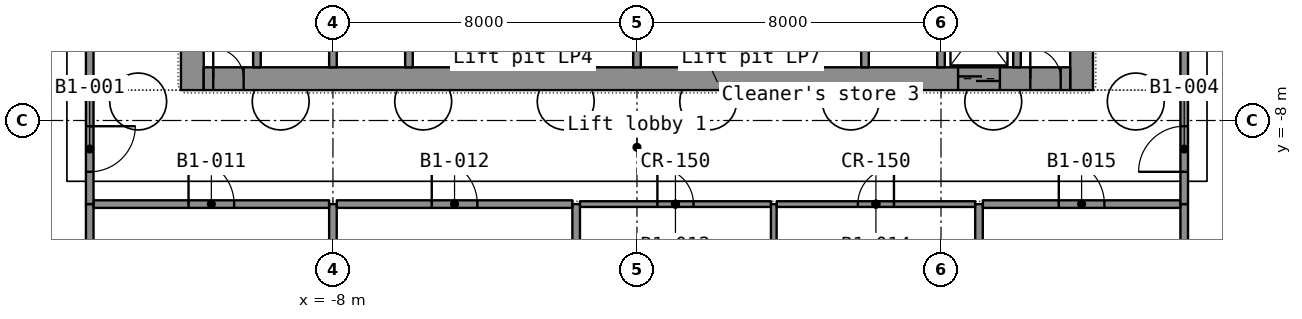
"""IFC4 building model, lengths in metres.
Left out: names, types, materials, properties, quantities, classifications, styles, units other than length and angle.
Written with IfcOpenShell. Run it as: python <this file> out.ifc"""

import sys

from ifc_helpers import new_model, si_unit, direction, frame, frame_2d, origin, place, context, subcontext, project, spatial, rectangle, extrude, element, fill, save


model = new_model("IFC4")
c1 = context("Model", 3, precision=1e-05, world=origin(), true_north=direction((0.0, 1.0)))
c2 = subcontext(c1, "Body", "Model", "MODEL_VIEW")
j1 = project(units=[si_unit("LENGTHUNIT", "METRE"), si_unit("PLANEANGLEUNIT", "RADIAN")], contexts=[c1])
p1 = place(None, origin())
s1 = spatial("IfcSite", under=j1, at=p1, CompositionType="ELEMENT")
p2 = place(p1, origin())
s2 = spatial("IfcBuilding", under=s1, at=p2, CompositionType="ELEMENT")
p3 = place(p2, frame((0.0, 0.0, -5.0)))
s3 = spatial("IfcBuildingStorey", under=s2, at=p3, CompositionType="ELEMENT", Elevation=-5.0)
p4 = place(p3, frame((-11.7, -7.2, 0.0), z_axis=(0.0, 0.0, 1.0), x_axis=(0.0, 1.0, 0.0)))
e1 = element("IfcWall", 1, at=p4, inside=s3, PredefinedType="SHEAR", context=c2, shape_type="SweptSolid", body=[
    extrude(rectangle(XDim=14.4, YDim=0.6, at=frame_2d((7.2, 0.0))), origin(), (0.0, 0.0, 1.0), 4.6),
])
p5 = place(p4, frame((6.5, 0.0, 0.0)))
e2 = element("IfcOpeningElement", 2, at=p5, cuts=e1, PredefinedType="OPENING", context=c2, shape_type="SweptSolid", body=[
    extrude(rectangle(XDim=1.4, YDim=2.2, at=frame_2d((0.7, 1.1))), frame((0.0, 0.31, 0.0), z_axis=(0.0, -1.0, 0.0), x_axis=(1.0, 0.0, 0.0)), (0.0, 0.0, 1.0), 0.62),
])
p6 = place(p3, frame((11.7, -7.2, 0.0), z_axis=(0.0, 0.0, 1.0), x_axis=(0.0, 1.0, 0.0)))
e3 = element("IfcWall", 3, at=p6, inside=s3, PredefinedType="SHEAR", context=c2, shape_type="SweptSolid", body=[
    extrude(rectangle(XDim=14.4, YDim=0.6, at=frame_2d((7.2, 0.0))), origin(), (0.0, 0.0, 1.0), 4.6),
])
p7 = place(p6, frame((6.5, 0.0, 0.0)))
e4 = element("IfcOpeningElement", 4, at=p7, cuts=e3, PredefinedType="OPENING", context=c2, shape_type="SweptSolid", body=[
    extrude(rectangle(XDim=1.4, YDim=2.2, at=frame_2d((0.7, 1.1))), frame((0.0, 0.31, 0.0), z_axis=(0.0, -1.0, 0.0), x_axis=(1.0, 0.0, 0.0)), (0.0, 0.0, 1.0), 0.62),
])
p8 = place(p3, frame((-11.4, -6.9, 0.0), z_axis=(0.0, 0.0, 1.0), x_axis=(1.0, 0.0, 0.0)))
e5 = element("IfcWall", 5, at=p8, inside=s3, PredefinedType="SHEAR", context=c2, shape_type="SweptSolid", body=[
    extrude(rectangle(XDim=22.8, YDim=0.6, at=frame_2d((11.4, 0.0))), origin(), (0.0, 0.0, 1.0), 4.6),
])
p9 = place(p8, frame((19.85, 0.0, 0.0)))
e6 = element("IfcOpeningElement", 6, at=p9, cuts=e5, PredefinedType="OPENING", context=c2, shape_type="SweptSolid", body=[
    extrude(rectangle(XDim=1.1, YDim=2.2, at=frame_2d((0.55, 1.1))), frame((0.0, 0.31, 0.0), z_axis=(0.0, -1.0, 0.0), x_axis=(1.0, 0.0, 0.0)), (0.0, 0.0, 1.0), 0.62),
])
p10 = place(p8, frame((0.25, 0.0, 0.0)))
e7 = element("IfcOpeningElement", 7, at=p10, cuts=e5, PredefinedType="OPENING", context=c2, shape_type="SweptSolid", body=[
    extrude(rectangle(XDim=0.8, YDim=2.05, at=frame_2d((0.4, 1.025))), frame((0.0, 0.31, 0.0), z_axis=(0.0, -1.0, 0.0), x_axis=(1.0, 0.0, 0.0)), (0.0, 0.0, 1.0), 0.62),
])
p11 = place(p8, frame((21.75, 0.0, 0.0)))
e8 = element("IfcOpeningElement", 8, at=p11, cuts=e5, PredefinedType="OPENING", context=c2, shape_type="SweptSolid", body=[
    extrude(rectangle(XDim=0.8, YDim=2.05, at=frame_2d((0.4, 1.025))), frame((0.0, 0.31, 0.0), z_axis=(0.0, -1.0, 0.0), x_axis=(1.0, 0.0, 0.0)), (0.0, 0.0, 1.0), 0.62),
])
for number, where, z_axis, x_axis in (
    (9, (-10.0, -6.6, 0.0), (0.0, 0.0, 1.0), (0.0, 1.0, 0.0)),
    (10, (-8.0, -6.6, 0.0), (0.0, 0.0, 1.0), (0.0, 1.0, 0.0)),
    (11, (-6.0, -6.6, 0.0), (0.0, 0.0, 1.0), (0.0, 1.0, 0.0)),
    (12, (-4.0, -6.6, 0.0), (0.0, 0.0, 1.0), (0.0, 1.0, 0.0)),
    (13, (-2.0, -6.6, 0.0), (0.0, 0.0, 1.0), (0.0, 1.0, 0.0)),
    (14, (0.0, -6.6, 0.0), (0.0, 0.0, 1.0), (0.0, 1.0, 0.0)),
    (15, (2.0, -6.6, 0.0), (0.0, 0.0, 1.0), (0.0, 1.0, 0.0)),
    (16, (4.0, -6.6, 0.0), (0.0, 0.0, 1.0), (0.0, 1.0, 0.0)),
    (17, (6.0, -6.6, 0.0), (0.0, 0.0, 1.0), (0.0, 1.0, 0.0)),
    (18, (8.0, -6.6, 0.0), (0.0, 0.0, 1.0), (0.0, 1.0, 0.0)),
    (19, (10.0, -6.6, 0.0), (0.0, 0.0, 1.0), (0.0, 1.0, 0.0)),
):
    element("IfcWall", number, at=place(p3, frame(where, z_axis=z_axis, x_axis=x_axis)), inside=s3, PredefinedType="SHEAR", context=c2, shape_type="SweptSolid", body=[
        extrude(rectangle(XDim=2.7, YDim=0.2, at=frame_2d((1.35, 0.0))), origin(), (0.0, 0.0, 1.0), 4.6),
    ])
p12 = place(p3, frame((-1.6, -26.824, 0.0), z_axis=(0.0, 0.0, 1.0), x_axis=(0.0, 1.0, 0.0)))
e20 = element("IfcWall", 20, at=p12, inside=s3, PredefinedType="PARTITIONING", context=c2, shape_type="SweptSolid", body=[
    extrude(rectangle(XDim=16.624, YDim=0.2, at=frame_2d((8.312, 0.0))), origin(), (0.0, 0.0, 1.0), 3.6),
])
for number, where, z_axis, x_axis in (
    (21, (-14.4, -7.2, 0.0), (0.0, 0.0, 1.0), (-1.0, 0.0, 0.0)),
    (22, (31.1, -7.2, 0.0), (0.0, 0.0, 1.0), (-1.0, 0.0, 0.0)),
):
    element("IfcWall", number, at=place(p3, frame(where, z_axis=z_axis, x_axis=x_axis)), inside=s3, PredefinedType="PARTITIONING", context=c2, shape_type="SweptSolid", body=[
        extrude(rectangle(XDim=16.7, YDim=0.2, at=frame_2d((8.35, 0.0))), origin(), (0.0, 0.0, 1.0), 3.6),
    ])
p13 = place(p3, frame((3.6, -26.69, 0.0), z_axis=(0.0, 0.0, 1.0), x_axis=(0.0, 1.0, 0.0)))
e23 = element("IfcWall", 23, at=p13, inside=s3, PredefinedType="PARTITIONING", context=c2, shape_type="SweptSolid", body=[
    extrude(rectangle(XDim=16.49, YDim=0.15, at=frame_2d((8.245, 0.0))), origin(), (0.0, 0.0, 1.0), 3.6),
])
p14 = place(p3, frame((-8.0, -26.12, 0.0), z_axis=(0.0, 0.0, 1.0), x_axis=(0.0, 1.0, 0.0)))
e24 = element("IfcWall", 24, at=p14, inside=s3, PredefinedType="PARTITIONING", context=c2, shape_type="SweptSolid", body=[
    extrude(rectangle(XDim=15.92, YDim=0.2, at=frame_2d((7.96, 0.0))), origin(), (0.0, 0.0, 1.0), 3.6),
])
p15 = place(p3, frame((9.0, -25.861, 0.0), z_axis=(0.0, 0.0, 1.0), x_axis=(0.0, 1.0, 0.0)))
e25 = element("IfcWall", 25, at=p15, inside=s3, PredefinedType="PARTITIONING", context=c2, shape_type="SweptSolid", body=[
    extrude(rectangle(XDim=15.661, YDim=0.2, at=frame_2d((7.831, 0.0))), origin(), (0.0, 0.0, 1.0), 3.6),
])
p16 = place(p3, frame((-14.4, 7.098, 0.0), z_axis=(0.0, 0.0, 1.0), x_axis=(0.0, -1.0, 0.0)))
e26 = element("IfcWall", 26, at=p16, inside=s3, PredefinedType="PARTITIONING", context=c2, shape_type="SweptSolid", body=[
    extrude(rectangle(XDim=14.196, YDim=0.2, at=frame_2d((7.098, 0.0))), origin(), (0.0, 0.0, 1.0), 3.6),
])
p17 = place(p16, frame((6.498, 0.0, 0.0)))
e27 = element("IfcOpeningElement", 27, at=p17, cuts=e26, PredefinedType="OPENING", context=c2, shape_type="SweptSolid", body=[
    extrude(rectangle(XDim=1.2, YDim=2.2, at=frame_2d((0.6, 1.1))), frame((0.0, 0.11, 0.0), z_axis=(0.0, -1.0, 0.0), x_axis=(1.0, 0.0, 0.0)), (0.0, 0.0, 1.0), 0.22),
])
p18 = place(p3, frame((14.4, -7.098, 0.0), z_axis=(0.0, 0.0, 1.0), x_axis=(0.0, 1.0, 0.0)))
e28 = element("IfcWall", 28, at=p18, inside=s3, PredefinedType="PARTITIONING", context=c2, shape_type="SweptSolid", body=[
    extrude(rectangle(XDim=14.196, YDim=0.2, at=frame_2d((7.098, 0.0))), origin(), (0.0, 0.0, 1.0), 3.6),
])
p19 = place(p18, frame((6.498, 0.0, 0.0)))
e29 = element("IfcOpeningElement", 29, at=p19, cuts=e28, PredefinedType="OPENING", context=c2, shape_type="SweptSolid", body=[
    extrude(rectangle(XDim=1.2, YDim=2.2, at=frame_2d((0.6, 1.1))), frame((0.0, 0.11, 0.0), z_axis=(0.0, -1.0, 0.0), x_axis=(1.0, 0.0, 0.0)), (0.0, 0.0, 1.0), 0.22),
])
for number, where, z_axis, x_axis in (
    (30, (-14.4, -23.991, 0.0), (0.0, 0.0, 1.0), (0.0, 1.0, 0.0)),
    (31, (14.4, -10.2, 0.0), (0.0, 0.0, 1.0), (0.0, -1.0, 0.0)),
):
    element("IfcWall", number, at=place(p3, frame(where, z_axis=z_axis, x_axis=x_axis)), inside=s3, PredefinedType="PARTITIONING", context=c2, shape_type="SweptSolid", body=[
        extrude(rectangle(XDim=13.791, YDim=0.2, at=frame_2d((6.896, 0.0))), origin(), (0.0, 0.0, 1.0), 3.6),
    ])
p20 = place(p3, frame((-14.298, -10.2, 0.0), z_axis=(0.0, 0.0, 1.0), x_axis=(1.0, 0.0, 0.0)))
e32 = element("IfcWall", 32, at=p20, inside=s3, PredefinedType="PARTITIONING", context=c2, shape_type="SweptSolid", body=[
    extrude(rectangle(XDim=6.196, YDim=0.2, at=frame_2d((3.098, 0.0))), origin(), (0.0, 0.0, 1.0), 3.6),
])
p21 = place(p20, frame((2.498, 0.0, 0.0)))
e33 = element("IfcOpeningElement", 33, at=p21, cuts=e32, PredefinedType="OPENING", context=c2, shape_type="SweptSolid", body=[
    extrude(rectangle(XDim=1.2, YDim=2.2, at=frame_2d((0.6, 1.1))), frame((0.0, 0.11, 0.0), z_axis=(0.0, -1.0, 0.0), x_axis=(1.0, 0.0, 0.0)), (0.0, 0.0, 1.0), 0.22),
])
p22 = place(p3, frame((-7.898, -10.2, 0.0), z_axis=(0.0, 0.0, 1.0), x_axis=(1.0, 0.0, 0.0)))
e34 = element("IfcWall", 34, at=p22, inside=s3, PredefinedType="PARTITIONING", context=c2, shape_type="SweptSolid", body=[
    extrude(rectangle(XDim=6.196, YDim=0.2, at=frame_2d((3.098, 0.0))), origin(), (0.0, 0.0, 1.0), 3.6),
])
p23 = place(p22, frame((2.498, 0.0, 0.0)))
e35 = element("IfcOpeningElement", 35, at=p23, cuts=e34, PredefinedType="OPENING", context=c2, shape_type="SweptSolid", body=[
    extrude(rectangle(XDim=1.2, YDim=2.2, at=frame_2d((0.6, 1.1))), frame((0.0, 0.11, 0.0), z_axis=(0.0, -1.0, 0.0), x_axis=(1.0, 0.0, 0.0)), (0.0, 0.0, 1.0), 0.22),
])
p24 = place(p3, frame((3.677, -10.2, 0.0), z_axis=(0.0, 0.0, 1.0), x_axis=(1.0, 0.0, 0.0)))
e36 = element("IfcWall", 36, at=p24, inside=s3, PredefinedType="PARTITIONING", context=c2, shape_type="SweptSolid", body=[
    extrude(rectangle(XDim=5.221, YDim=0.15, at=frame_2d((2.61, 0.0))), origin(), (0.0, 0.0, 1.0), 3.6),
])
p25 = place(p24, frame((2.135, 0.0, 0.0)))
e37 = element("IfcOpeningElement", 37, at=p25, cuts=e36, PredefinedType="OPENING", context=c2, shape_type="SweptSolid", body=[
    extrude(rectangle(XDim=0.95, YDim=2.15, at=frame_2d((0.475, 1.075))), frame((0.0, 0.085, 0.0), z_axis=(0.0, -1.0, 0.0), x_axis=(1.0, 0.0, 0.0)), (0.0, 0.0, 1.0), 0.17),
])
p26 = place(p3, frame((9.102, -10.2, 0.0), z_axis=(0.0, 0.0, 1.0), x_axis=(1.0, 0.0, 0.0)))
e38 = element("IfcWall", 38, at=p26, inside=s3, PredefinedType="PARTITIONING", context=c2, shape_type="SweptSolid", body=[
    extrude(rectangle(XDim=5.196, YDim=0.2, at=frame_2d((2.598, 0.0))), origin(), (0.0, 0.0, 1.0), 3.6),
])
p27 = place(p26, frame((1.998, 0.0, 0.0)))
e39 = element("IfcOpeningElement", 39, at=p27, cuts=e38, PredefinedType="OPENING", context=c2, shape_type="SweptSolid", body=[
    extrude(rectangle(XDim=1.2, YDim=2.2, at=frame_2d((0.6, 1.1))), frame((0.0, 0.11, 0.0), z_axis=(0.0, -1.0, 0.0), x_axis=(1.0, 0.0, 0.0)), (0.0, 0.0, 1.0), 0.22),
])
p28 = place(p3, frame((-1.498, -10.2, 0.0), z_axis=(0.0, 0.0, 1.0), x_axis=(1.0, 0.0, 0.0)))
e40 = element("IfcWall", 40, at=p28, inside=s3, PredefinedType="PARTITIONING", context=c2, shape_type="SweptSolid", body=[
    extrude(rectangle(XDim=5.021, YDim=0.15, at=frame_2d((2.51, 0.0))), origin(), (0.0, 0.0, 1.0), 3.6),
])
p29 = place(p28, frame((2.035, 0.0, 0.0)))
e41 = element("IfcOpeningElement", 41, at=p29, cuts=e40, PredefinedType="OPENING", context=c2, shape_type="SweptSolid", body=[
    extrude(rectangle(XDim=0.95, YDim=2.15, at=frame_2d((0.475, 1.075))), frame((0.0, 0.085, 0.0), z_axis=(0.0, -1.0, 0.0), x_axis=(1.0, 0.0, 0.0)), (0.0, 0.0, 1.0), 0.17),
])
p30 = place(p3, frame((-14.4, -7.302, 0.0), z_axis=(0.0, 0.0, 1.0), x_axis=(0.0, -1.0, 0.0)))
e42 = element("IfcWall", 42, at=p30, inside=s3, PredefinedType="PARTITIONING", context=c2, shape_type="SweptSolid", body=[
    extrude(rectangle(XDim=2.897, YDim=0.2, at=frame_2d((1.448, 0.0))), origin(), (0.0, 0.0, 1.0), 3.6),
])
p31 = place(p30, frame((0.848, 0.0, 0.0)))
e43 = element("IfcOpeningElement", 43, at=p31, cuts=e42, PredefinedType="OPENING", context=c2, shape_type="SweptSolid", body=[
    extrude(rectangle(XDim=1.2, YDim=2.2, at=frame_2d((0.6, 1.1))), frame((0.0, 0.11, 0.0), z_axis=(0.0, -1.0, 0.0), x_axis=(1.0, 0.0, 0.0)), (0.0, 0.0, 1.0), 0.22),
])
p32 = place(p3, frame((14.4, -10.199, 0.0), z_axis=(0.0, 0.0, 1.0), x_axis=(0.0, 1.0, 0.0)))
e44 = element("IfcWall", 44, at=p32, inside=s3, PredefinedType="PARTITIONING", context=c2, shape_type="SweptSolid", body=[
    extrude(rectangle(XDim=2.897, YDim=0.2, at=frame_2d((1.448, 0.0))), origin(), (0.0, 0.0, 1.0), 3.6),
])
p33 = place(p32, frame((0.848, 0.0, 0.0)))
e45 = element("IfcOpeningElement", 45, at=p33, cuts=e44, PredefinedType="OPENING", context=c2, shape_type="SweptSolid", body=[
    extrude(rectangle(XDim=1.2, YDim=2.2, at=frame_2d((0.6, 1.1))), frame((0.0, 0.11, 0.0), z_axis=(0.0, -1.0, 0.0), x_axis=(1.0, 0.0, 0.0)), (0.0, 0.0, 1.0), 0.22),
])
p34 = place(p9, origin())
e46 = element("IfcDoor", 46, at=p34, inside=s3, OperationType="DOUBLE_DOOR_SLIDING", PredefinedType="DOOR", context=c2, shape_type="SweptSolid", body=[
    extrude(rectangle(XDim=1.1, YDim=2.2, at=frame_2d((0.55, 1.1))), frame((0.0, 0.025, 0.0), z_axis=(0.0, -1.0, 0.0), x_axis=(1.0, 0.0, 0.0)), (0.0, 0.0, 1.0), 0.05),
])
fill(e6, e46)
p35 = place(p10, origin())
e47 = element("IfcDoor", 47, at=p35, inside=s3, OperationType="SINGLE_SWING_LEFT", PredefinedType="DOOR", context=c2, shape_type="SweptSolid", body=[
    extrude(rectangle(XDim=0.8, YDim=2.05, at=frame_2d((0.4, 1.025))), frame((0.0, 0.025, 0.0), z_axis=(0.0, -1.0, 0.0), x_axis=(1.0, 0.0, 0.0)), (0.0, 0.0, 1.0), 0.05),
])
fill(e7, e47)
p36 = place(p11, origin())
e48 = element("IfcDoor", 48, at=p36, inside=s3, OperationType="SINGLE_SWING_LEFT", PredefinedType="DOOR", context=c2, shape_type="SweptSolid", body=[
    extrude(rectangle(XDim=0.8, YDim=2.05, at=frame_2d((0.4, 1.025))), frame((0.0, 0.025, 0.0), z_axis=(0.0, -1.0, 0.0), x_axis=(1.0, 0.0, 0.0)), (0.0, 0.0, 1.0), 0.05),
])
fill(e8, e48)
p37 = place(p31, origin())
e49 = element("IfcDoor", 49, at=p37, inside=s3, OperationType="DOUBLE_DOOR_SINGLE_SWING", PredefinedType="DOOR", context=c2, shape_type="SweptSolid", body=[
    extrude(rectangle(XDim=1.2, YDim=2.2, at=frame_2d((0.6, 1.1))), frame((0.0, 0.025, 0.0), z_axis=(0.0, -1.0, 0.0), x_axis=(1.0, 0.0, 0.0)), (0.0, 0.0, 1.0), 0.05),
])
fill(e43, e49)
p38 = place(p33, origin())
e50 = element("IfcDoor", 50, at=p38, inside=s3, OperationType="DOUBLE_DOOR_SINGLE_SWING", PredefinedType="DOOR", context=c2, shape_type="SweptSolid", body=[
    extrude(rectangle(XDim=1.2, YDim=2.2, at=frame_2d((0.6, 1.1))), frame((0.0, 0.025, 0.0), z_axis=(0.0, -1.0, 0.0), x_axis=(1.0, 0.0, 0.0)), (0.0, 0.0, 1.0), 0.05),
])
fill(e45, e50)
p39 = place(p21, origin())
e51 = element("IfcDoor", 51, at=p39, inside=s3, OperationType="DOUBLE_DOOR_SINGLE_SWING", PredefinedType="DOOR", context=c2, shape_type="SweptSolid", body=[
    extrude(rectangle(XDim=1.2, YDim=2.2, at=frame_2d((0.6, 1.1))), frame((0.0, 0.025, 0.0), z_axis=(0.0, -1.0, 0.0), x_axis=(1.0, 0.0, 0.0)), (0.0, 0.0, 1.0), 0.05),
])
fill(e33, e51)
p40 = place(p23, origin())
e52 = element("IfcDoor", 52, at=p40, inside=s3, OperationType="DOUBLE_DOOR_SINGLE_SWING", PredefinedType="DOOR", context=c2, shape_type="SweptSolid", body=[
    extrude(rectangle(XDim=1.2, YDim=2.2, at=frame_2d((0.6, 1.1))), frame((0.0, 0.025, 0.0), z_axis=(0.0, -1.0, 0.0), x_axis=(1.0, 0.0, 0.0)), (0.0, 0.0, 1.0), 0.05),
])
fill(e35, e52)
p41 = place(p29, origin())
e53 = element("IfcDoor", 53, at=p41, inside=s3, OperationType="SINGLE_SWING_LEFT", PredefinedType="DOOR", context=c2, shape_type="SweptSolid", body=[
    extrude(rectangle(XDim=0.95, YDim=2.15, at=frame_2d((0.475, 1.075))), frame((0.0, 0.025, 0.0), z_axis=(0.0, -1.0, 0.0), x_axis=(1.0, 0.0, 0.0)), (0.0, 0.0, 1.0), 0.05),
])
fill(e41, e53)
p42 = place(p25, origin())
e54 = element("IfcDoor", 54, at=p42, inside=s3, OperationType="SINGLE_SWING_RIGHT", PredefinedType="DOOR", context=c2, shape_type="SweptSolid", body=[
    extrude(rectangle(XDim=0.95, YDim=2.15, at=frame_2d((0.475, 1.075))), frame((0.0, 0.025, 0.0), z_axis=(0.0, -1.0, 0.0), x_axis=(1.0, 0.0, 0.0)), (0.0, 0.0, 1.0), 0.05),
])
fill(e37, e54)
p43 = place(p27, origin())
e55 = element("IfcDoor", 55, at=p43, inside=s3, OperationType="DOUBLE_DOOR_SINGLE_SWING", PredefinedType="DOOR", context=c2, shape_type="SweptSolid", body=[
    extrude(rectangle(XDim=1.2, YDim=2.2, at=frame_2d((0.6, 1.1))), frame((0.0, 0.025, 0.0), z_axis=(0.0, -1.0, 0.0), x_axis=(1.0, 0.0, 0.0)), (0.0, 0.0, 1.0), 0.05),
])
fill(e39, e55)
save(model, sys.argv[1])
